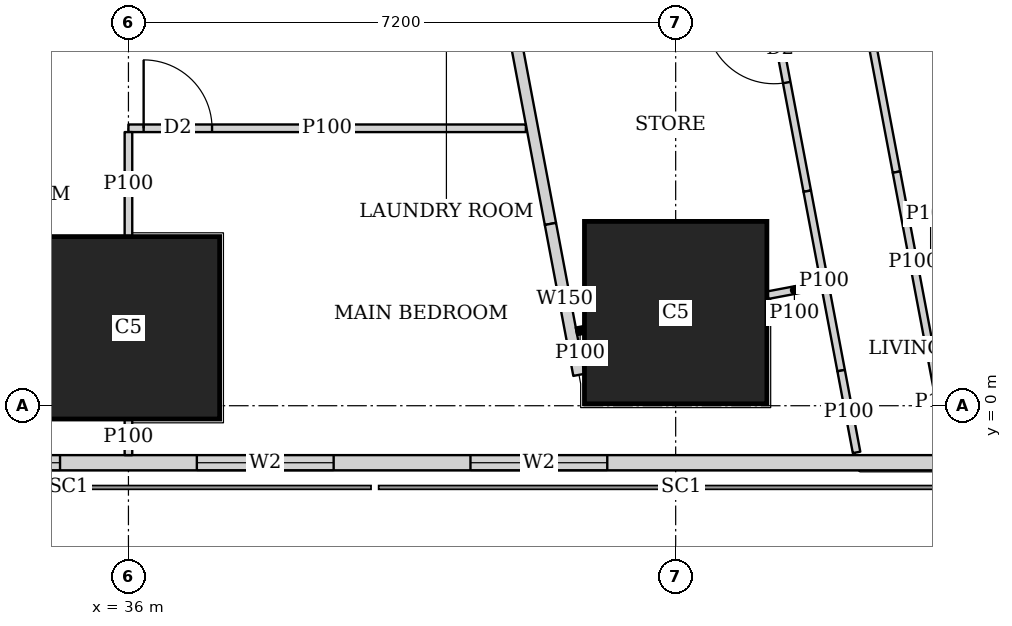
"""IFC4 building model, lengths in metres.
Left out: names, types, materials, properties, quantities, classifications, styles, units other than length and angle.
Written with IfcOpenShell. Run it as: python <this file> out.ifc"""

import sys

from ifc_helpers import new_model, si_unit, direction, frame, frame_2d, origin, origin_2d, place, context, subcontext, project, spatial, rectangle, extrude, element, fill, save


model = new_model("IFC4")
c1 = context("Model", 3, precision=1e-05, world=origin(), true_north=direction((0.0, 1.0)))
c2 = subcontext(c1, "Body", "Model", "MODEL_VIEW")
j1 = project(units=[si_unit("LENGTHUNIT", "METRE"), si_unit("PLANEANGLEUNIT", "RADIAN")], contexts=[c1])
p1 = place(None, origin())
s1 = spatial("IfcSite", under=j1, at=p1, CompositionType="ELEMENT")
p2 = place(p1, origin())
s2 = spatial("IfcBuilding", under=s1, at=p2, CompositionType="ELEMENT")
p3 = place(p2, frame((0.0, 0.0, 234.95)))
s3 = spatial("IfcBuildingStorey", under=s2, at=p3, CompositionType="ELEMENT", Elevation=234.95)
for number, where, z_axis, x_axis in (
    (1, (36.0, 1.025, 0.0), (0.0, 0.0, 1.0), (1.0, 0.0, 0.0)),
    (2, (43.2, 1.225, 0.0), (0.0, 0.0, 1.0), (1.0, 0.0, 0.0)),
):
    element("IfcColumn", number, at=place(p3, frame(where, z_axis=z_axis, x_axis=x_axis)), inside=s3, PredefinedType="COLUMN", context=c2, shape_type="SweptSolid", body=[
        extrude(rectangle(XDim=2.4, YDim=2.4, at=origin_2d()), origin(), (0.0, 0.0, 1.0), 3.75),
    ])
p4 = place(p3, frame((14.563, -0.75, 0.0), z_axis=(0.0, 0.0, 1.0), x_axis=(1.0, 0.0, 0.0)))
e3 = element("IfcWall", 3, at=p4, inside=s3, PredefinedType="SOLIDWALL", context=c2, shape_type="SweptSolid", body=[
    extrude(rectangle(XDim=33.228, YDim=0.2, at=frame_2d((16.614, 0.0))), origin(), (0.0, 0.0, 1.0), 3.5),
])
p5 = place(p4, frame((2.319, 0.0, 0.9)))
e4 = element("IfcOpeningElement", 4, at=p5, cuts=e3, PredefinedType="OPENING", context=c2, shape_type="SweptSolid", body=[
    extrude(rectangle(XDim=2.4, YDim=1.5, at=frame_2d((1.2, 0.75))), frame((0.0, 0.11, 0.0), z_axis=(0.0, -1.0, 0.0), x_axis=(1.0, 0.0, 0.0)), (0.0, 0.0, 1.0), 0.22),
])
p6 = place(p4, frame((7.937, 0.0, 0.9)))
e5 = element("IfcOpeningElement", 5, at=p6, cuts=e3, PredefinedType="OPENING", context=c2, shape_type="SweptSolid", body=[
    extrude(rectangle(XDim=1.8, YDim=1.5, at=frame_2d((0.9, 0.75))), frame((0.0, 0.11, 0.0), z_axis=(0.0, -1.0, 0.0), x_axis=(1.0, 0.0, 0.0)), (0.0, 0.0, 1.0), 0.22),
])
p7 = place(p4, frame((11.537, 0.0, 0.9)))
e6 = element("IfcOpeningElement", 6, at=p7, cuts=e3, PredefinedType="OPENING", context=c2, shape_type="SweptSolid", body=[
    extrude(rectangle(XDim=1.8, YDim=1.5, at=frame_2d((0.9, 0.75))), frame((0.0, 0.11, 0.0), z_axis=(0.0, -1.0, 0.0), x_axis=(1.0, 0.0, 0.0)), (0.0, 0.0, 1.0), 0.22),
])
p8 = place(p4, frame((15.137, 0.0, 0.9)))
e7 = element("IfcOpeningElement", 7, at=p8, cuts=e3, PredefinedType="OPENING", context=c2, shape_type="SweptSolid", body=[
    extrude(rectangle(XDim=1.8, YDim=1.5, at=frame_2d((0.9, 0.75))), frame((0.0, 0.11, 0.0), z_axis=(0.0, -1.0, 0.0), x_axis=(1.0, 0.0, 0.0)), (0.0, 0.0, 1.0), 0.22),
])
p9 = place(p4, frame((18.737, 0.0, 0.9)))
e8 = element("IfcOpeningElement", 8, at=p9, cuts=e3, PredefinedType="OPENING", context=c2, shape_type="SweptSolid", body=[
    extrude(rectangle(XDim=1.8, YDim=1.5, at=frame_2d((0.9, 0.75))), frame((0.0, 0.11, 0.0), z_axis=(0.0, -1.0, 0.0), x_axis=(1.0, 0.0, 0.0)), (0.0, 0.0, 1.0), 0.22),
])
p10 = place(p4, frame((22.337, 0.0, 0.9)))
e9 = element("IfcOpeningElement", 9, at=p10, cuts=e3, PredefinedType="OPENING", context=c2, shape_type="SweptSolid", body=[
    extrude(rectangle(XDim=1.8, YDim=1.5, at=frame_2d((0.9, 0.75))), frame((0.0, 0.11, 0.0), z_axis=(0.0, -1.0, 0.0), x_axis=(1.0, 0.0, 0.0)), (0.0, 0.0, 1.0), 0.22),
])
p11 = place(p4, frame((25.937, 0.0, 0.9)))
e10 = element("IfcOpeningElement", 10, at=p11, cuts=e3, PredefinedType="OPENING", context=c2, shape_type="SweptSolid", body=[
    extrude(rectangle(XDim=1.8, YDim=1.5, at=frame_2d((0.9, 0.75))), frame((0.0, 0.11, 0.0), z_axis=(0.0, -1.0, 0.0), x_axis=(1.0, 0.0, 0.0)), (0.0, 0.0, 1.0), 0.22),
])
p12 = place(p3, frame((50.653, 2.703, 0.0), z_axis=(0.0, 0.0, 1.0), x_axis=(-0.185612026696, 0.982623109613, 0.0)))
e11 = element("IfcWall", 11, at=p12, inside=s3, PredefinedType="SOLIDWALL", context=c2, shape_type="SweptSolid", body=[
    extrude(rectangle(XDim=41.393, YDim=0.2, at=frame_2d((20.697, 0.0))), origin(), (0.0, 0.0, 1.0), 3.5),
])
p13 = place(p12, frame((1.633, 0.0, 0.9)))
e12 = element("IfcOpeningElement", 12, at=p13, cuts=e11, PredefinedType="OPENING", context=c2, shape_type="SweptSolid", body=[
    extrude(rectangle(XDim=1.8, YDim=1.5, at=frame_2d((0.9, 0.75))), frame((0.0, 0.11, 0.0), z_axis=(0.0, -1.0, 0.0), x_axis=(1.0, 0.0, 0.0)), (0.0, 0.0, 1.0), 0.22),
])
p14 = place(p12, frame((6.032, 0.0, 0.9)))
e13 = element("IfcOpeningElement", 13, at=p14, cuts=e11, PredefinedType="OPENING", context=c2, shape_type="SweptSolid", body=[
    extrude(rectangle(XDim=1.8, YDim=1.5, at=frame_2d((0.9, 0.75))), frame((0.0, 0.11, 0.0), z_axis=(0.0, -1.0, 0.0), x_axis=(1.0, 0.0, 0.0)), (0.0, 0.0, 1.0), 0.22),
])
p15 = place(p12, frame((9.848, 0.0, 0.9)))
e14 = element("IfcOpeningElement", 14, at=p15, cuts=e11, PredefinedType="OPENING", context=c2, shape_type="SweptSolid", body=[
    extrude(rectangle(XDim=1.8, YDim=1.5, at=frame_2d((0.9, 0.75))), frame((0.0, 0.11, 0.0), z_axis=(0.0, -1.0, 0.0), x_axis=(1.0, 0.0, 0.0)), (0.0, 0.0, 1.0), 0.22),
])
p16 = place(p12, frame((13.664, 0.0, 0.9)))
e15 = element("IfcOpeningElement", 15, at=p16, cuts=e11, PredefinedType="OPENING", context=c2, shape_type="SweptSolid", body=[
    extrude(rectangle(XDim=1.8, YDim=1.5, at=frame_2d((0.9, 0.75))), frame((0.0, 0.11, 0.0), z_axis=(0.0, -1.0, 0.0), x_axis=(1.0, 0.0, 0.0)), (0.0, 0.0, 1.0), 0.22),
])
p17 = place(p12, frame((17.481, 0.0, 0.9)))
e16 = element("IfcOpeningElement", 16, at=p17, cuts=e11, PredefinedType="OPENING", context=c2, shape_type="SweptSolid", body=[
    extrude(rectangle(XDim=1.8, YDim=1.5, at=frame_2d((0.9, 0.75))), frame((0.0, 0.11, 0.0), z_axis=(0.0, -1.0, 0.0), x_axis=(1.0, 0.0, 0.0)), (0.0, 0.0, 1.0), 0.22),
])
p18 = place(p12, frame((21.297, 0.0, 0.9)))
e17 = element("IfcOpeningElement", 17, at=p18, cuts=e11, PredefinedType="OPENING", context=c2, shape_type="SweptSolid", body=[
    extrude(rectangle(XDim=1.8, YDim=1.5, at=frame_2d((0.9, 0.75))), frame((0.0, 0.11, 0.0), z_axis=(0.0, -1.0, 0.0), x_axis=(1.0, 0.0, 0.0)), (0.0, 0.0, 1.0), 0.22),
])
p19 = place(p12, frame((25.113, 0.0, 0.9)))
e18 = element("IfcOpeningElement", 18, at=p19, cuts=e11, PredefinedType="OPENING", context=c2, shape_type="SweptSolid", body=[
    extrude(rectangle(XDim=1.8, YDim=1.5, at=frame_2d((0.9, 0.75))), frame((0.0, 0.11, 0.0), z_axis=(0.0, -1.0, 0.0), x_axis=(1.0, 0.0, 0.0)), (0.0, 0.0, 1.0), 0.22),
])
p20 = place(p12, frame((28.93, 0.0, 0.9)))
e19 = element("IfcOpeningElement", 19, at=p20, cuts=e11, PredefinedType="OPENING", context=c2, shape_type="SweptSolid", body=[
    extrude(rectangle(XDim=1.8, YDim=1.5, at=frame_2d((0.9, 0.75))), frame((0.0, 0.11, 0.0), z_axis=(0.0, -1.0, 0.0), x_axis=(1.0, 0.0, 0.0)), (0.0, 0.0, 1.0), 0.22),
])
p21 = place(p12, frame((32.746, 0.0, 0.9)))
e20 = element("IfcOpeningElement", 20, at=p21, cuts=e11, PredefinedType="OPENING", context=c2, shape_type="SweptSolid", body=[
    extrude(rectangle(XDim=1.8, YDim=1.5, at=frame_2d((0.9, 0.75))), frame((0.0, 0.11, 0.0), z_axis=(0.0, -1.0, 0.0), x_axis=(1.0, 0.0, 0.0)), (0.0, 0.0, 1.0), 0.22),
])
p22 = place(p12, frame((36.481, 0.0, 0.9)))
e21 = element("IfcOpeningElement", 21, at=p22, cuts=e11, PredefinedType="OPENING", context=c2, shape_type="SweptSolid", body=[
    extrude(rectangle(XDim=1.8, YDim=1.5, at=frame_2d((0.9, 0.75))), frame((0.0, 0.11, 0.0), z_axis=(0.0, -1.0, 0.0), x_axis=(1.0, 0.0, 0.0)), (0.0, 0.0, 1.0), 0.22),
])
p23 = place(p3, frame((33.933, 42.73, 0.0), z_axis=(0.0, 0.0, 1.0), x_axis=(0.185595417643, -0.982626246825, 0.0)))
e22 = element("IfcWall", 22, at=p23, inside=s3, PredefinedType="SOLIDWALL", context=c2, shape_type="SweptSolid", body=[
    extrude(rectangle(XDim=41.051, YDim=0.15, at=frame_2d((20.525, 0.0))), origin(), (0.0, 0.0, 1.0), 2.5),
])
p24 = place(p23, frame((12.266, 0.0, 0.0)))
e23 = element("IfcOpeningElement", 23, at=p24, cuts=e22, PredefinedType="OPENING", context=c2, shape_type="SweptSolid", body=[
    extrude(rectangle(XDim=1.0, YDim=2.1, at=frame_2d((0.5, 1.05))), frame((0.0, 0.085, 0.0), z_axis=(0.0, -1.0, 0.0), x_axis=(1.0, 0.0, 0.0)), (0.0, 0.0, 1.0), 0.17),
])
p25 = place(p23, frame((16.082, 0.0, 0.0)))
e24 = element("IfcOpeningElement", 24, at=p25, cuts=e22, PredefinedType="OPENING", context=c2, shape_type="SweptSolid", body=[
    extrude(rectangle(XDim=1.0, YDim=2.1, at=frame_2d((0.5, 1.05))), frame((0.0, 0.085, 0.0), z_axis=(0.0, -1.0, 0.0), x_axis=(1.0, 0.0, 0.0)), (0.0, 0.0, 1.0), 0.17),
])
p26 = place(p23, frame((30.862, 0.0, 0.0)))
e25 = element("IfcOpeningElement", 25, at=p26, cuts=e22, PredefinedType="OPENING", context=c2, shape_type="SweptSolid", body=[
    extrude(rectangle(XDim=1.0, YDim=2.1, at=frame_2d((0.5, 1.05))), frame((0.0, 0.085, 0.0), z_axis=(0.0, -1.0, 0.0), x_axis=(1.0, 0.0, 0.0)), (0.0, 0.0, 1.0), 0.17),
])
p27 = place(p3, frame((41.552, 2.392, 0.0), z_axis=(0.0, 0.0, 1.0), x_axis=(0.185535500323, -0.982637561932, 0.0)))
e26 = element("IfcWall", 26, at=p27, inside=s3, PredefinedType="SOLIDWALL", context=c2, shape_type="SweptSolid", body=[
    extrude(rectangle(XDim=2.021, YDim=0.15, at=frame_2d((1.011, 0.0))), origin(), (0.0, 0.0, 1.0), 2.05),
])
p28 = place(p3, frame((41.229, 3.65, 0.0), z_axis=(0.0, 0.0, 1.0), x_axis=(-1.0, 0.0, 0.0)))
e27 = element("IfcWall", 27, at=p28, inside=s3, PredefinedType="PARTITIONING", context=c2, shape_type="SweptSolid", body=[
    extrude(rectangle(XDim=5.229, YDim=0.1, at=frame_2d((2.615, 0.0))), origin(), (0.0, 0.0, 1.0), 3.5),
])
p29 = place(p28, frame((4.129, 0.0, 0.0)))
e28 = element("IfcOpeningElement", 28, at=p29, cuts=e27, PredefinedType="OPENING", context=c2, shape_type="SweptSolid", body=[
    extrude(rectangle(XDim=0.9, YDim=2.1, at=frame_2d((0.45, 1.05))), frame((0.0, 0.06, 0.0), z_axis=(0.0, -1.0, 0.0), x_axis=(1.0, 0.0, 0.0)), (0.0, 0.0, 1.0), 0.12),
])
p30 = place(p3, frame((36.0, -0.65, 0.0), z_axis=(0.0, 0.0, 1.0), x_axis=(0.0, 1.0, 0.0)))
e29 = element("IfcWall", 29, at=p30, inside=s3, PredefinedType="PARTITIONING", context=c2, shape_type="SweptSolid", body=[
    extrude(rectangle(XDim=0.474, YDim=0.1, at=frame_2d((0.237, 0.0))), origin(), (0.0, 0.0, 1.0), 3.5),
])
p31 = place(p3, frame((36.0, 2.226, 0.0), z_axis=(0.0, 0.0, 1.0), x_axis=(0.0, 1.0, 0.0)))
e30 = element("IfcWall", 30, at=p31, inside=s3, PredefinedType="PARTITIONING", context=c2, shape_type="SweptSolid", body=[
    extrude(rectangle(XDim=1.374, YDim=0.1, at=frame_2d((0.687, 0.0))), origin(), (0.0, 0.0, 1.0), 3.5),
])
p32 = place(p3, frame((44.727, 10.366, 0.0), z_axis=(0.0, 0.0, 1.0), x_axis=(0.185678775129, -0.982610498858, 0.0)))
e31 = element("IfcWall", 31, at=p32, inside=s3, PredefinedType="PARTITIONING", context=c2, shape_type="SweptSolid", body=[
    extrude(rectangle(XDim=7.421, YDim=0.1, at=frame_2d((3.71, 0.0))), origin(), (0.0, 0.0, 1.0), 3.5),
])
p33 = place(p32, frame((0.151, 0.0, 0.0)))
e32 = element("IfcOpeningElement", 32, at=p33, cuts=e31, PredefinedType="OPENING", context=c2, shape_type="SweptSolid", body=[
    extrude(rectangle(XDim=0.9, YDim=2.1, at=frame_2d((0.45, 1.05))), frame((0.0, 0.06, 0.0), z_axis=(0.0, -1.0, 0.0), x_axis=(1.0, 0.0, 0.0)), (0.0, 0.0, 1.0), 0.12),
])
p34 = place(p32, frame((4.65, 0.0, 0.0)))
e33 = element("IfcOpeningElement", 33, at=p34, cuts=e31, PredefinedType="OPENING", context=c2, shape_type="SweptSolid", body=[
    extrude(rectangle(XDim=0.9, YDim=2.1, at=frame_2d((0.45, 1.05))), frame((0.0, 0.06, 0.0), z_axis=(0.0, -1.0, 0.0), x_axis=(1.0, 0.0, 0.0)), (0.0, 0.0, 1.0), 0.12),
])
p35 = place(p3, frame((46.105, 3.074, 0.0), z_axis=(0.0, 0.0, 1.0), x_axis=(0.185631845838, -0.982619365681, 0.0)))
e34 = element("IfcWall", 34, at=p35, inside=s3, PredefinedType="PARTITIONING", context=c2, shape_type="SweptSolid", body=[
    extrude(rectangle(XDim=2.403, YDim=0.1, at=frame_2d((1.201, 0.0))), origin(), (0.0, 0.0, 1.0), 2.05),
])
p36 = place(p3, frame((46.551, 0.713, 0.0), z_axis=(0.0, 0.0, 1.0), x_axis=(0.185407859198, -0.982661653748, 0.0)))
e35 = element("IfcWall", 35, at=p36, inside=s3, PredefinedType="PARTITIONING", context=c2, shape_type="SweptSolid", body=[
    extrude(rectangle(XDim=1.343, YDim=0.1, at=frame_2d((0.671, 0.0))), origin(), (0.0, 0.0, 1.0), 3.5),
])
p37 = place(p3, frame((43.949, 8.02, 0.0), z_axis=(0.0, 0.0, 1.0), x_axis=(0.185656792073, -0.982614652627, 0.0)))
e36 = element("IfcWall", 36, at=p37, inside=s3, PredefinedType="PARTITIONING", context=c2, shape_type="SweptSolid", body=[
    extrude(rectangle(XDim=5.289, YDim=0.1, at=frame_2d((2.645, 0.0))), origin(), (0.0, 0.0, 1.0), 3.5),
])
p38 = place(p37, frame((1.2, 0.0, 0.0)))
e37 = element("IfcOpeningElement", 37, at=p38, cuts=e36, PredefinedType="OPENING", context=c2, shape_type="SweptSolid", body=[
    extrude(rectangle(XDim=0.9, YDim=2.1, at=frame_2d((0.45, 1.05))), frame((0.0, 0.06, 0.0), z_axis=(0.0, -1.0, 0.0), x_axis=(1.0, 0.0, 0.0)), (0.0, 0.0, 1.0), 0.12),
])
p39 = place(p37, frame((2.935, 0.0, 0.0)))
e38 = element("IfcOpeningElement", 38, at=p39, cuts=e36, PredefinedType="OPENING", context=c2, shape_type="SweptSolid", body=[
    extrude(rectangle(XDim=0.9, YDim=2.1, at=frame_2d((0.45, 1.05))), frame((0.0, 0.06, 0.0), z_axis=(0.0, -1.0, 0.0), x_axis=(1.0, 0.0, 0.0)), (0.0, 0.0, 1.0), 0.12),
])
p40 = place(p3, frame((44.931, 2.823, 0.0), z_axis=(0.0, 0.0, 1.0), x_axis=(0.185631845838, -0.982619365681, 0.0)))
e39 = element("IfcWall", 39, at=p40, inside=s3, PredefinedType="PARTITIONING", context=c2, shape_type="SweptSolid", body=[
    extrude(rectangle(XDim=2.403, YDim=0.1, at=frame_2d((1.201, 0.0))), origin(), (0.0, 0.0, 1.0), 2.05),
])
p41 = place(p3, frame((45.377, 0.462, 0.0), z_axis=(0.0, 0.0, 1.0), x_axis=(0.185513480919, -0.982641719243, 0.0)))
e40 = element("IfcWall", 40, at=p41, inside=s3, PredefinedType="PARTITIONING", context=c2, shape_type="SweptSolid", body=[
    extrude(rectangle(XDim=1.095, YDim=0.1, at=frame_2d((0.547, 0.0))), origin(), (0.0, 0.0, 1.0), 3.5),
])
p42 = place(p3, frame((46.738, 2.006, 0.0), z_axis=(0.0, 0.0, 1.0), x_axis=(-0.982820466874, -0.184564161994, 0.0)))
e41 = element("IfcWall", 41, at=p42, inside=s3, PredefinedType="PARTITIONING", context=c2, shape_type="SweptSolid", body=[
    extrude(rectangle(XDim=0.374, YDim=0.1, at=frame_2d((0.187, 0.0))), origin(), (0.0, 0.0, 1.0), 2.05),
])
p43 = place(p3, frame((45.114, 1.587, 0.0), z_axis=(0.0, 0.0, 1.0), x_axis=(-0.982671022916, -0.185358195723, 0.0)))
e42 = element("IfcWall", 42, at=p43, inside=s3, PredefinedType="PARTITIONING", context=c2, shape_type="SweptSolid", body=[
    extrude(rectangle(XDim=0.717, YDim=0.1, at=frame_2d((0.358, 0.0))), origin(), (0.0, 0.0, 1.0), 2.05),
])
p44 = place(p3, frame((41.99, 0.997, 0.0), z_axis=(0.0, 0.0, 1.0), x_axis=(-0.982382747416, -0.186880008506, 0.0)))
e43 = element("IfcWall", 43, at=p44, inside=s3, PredefinedType="PARTITIONING", context=c2, shape_type="SweptSolid", body=[
    extrude(rectangle(XDim=0.097, YDim=0.1, at=frame_2d((0.048, 0.0))), origin(), (0.0, 0.0, 1.0), 2.05),
])
p45 = place(p9, origin())
e44 = element("IfcWindow", 44, at=p45, inside=s3, PartitioningType="SINGLE_PANEL", PredefinedType="WINDOW", context=c2, shape_type="SweptSolid", body=[
    extrude(rectangle(XDim=1.8, YDim=1.5, at=frame_2d((0.9, 0.75))), frame((0.0, 0.03, 0.0), z_axis=(0.0, -1.0, 0.0), x_axis=(1.0, 0.0, 0.0)), (0.0, 0.0, 1.0), 0.06),
])
fill(e8, e44)
p46 = place(p10, origin())
e45 = element("IfcWindow", 45, at=p46, inside=s3, PartitioningType="SINGLE_PANEL", PredefinedType="WINDOW", context=c2, shape_type="SweptSolid", body=[
    extrude(rectangle(XDim=1.8, YDim=1.5, at=frame_2d((0.9, 0.75))), frame((0.0, 0.03, 0.0), z_axis=(0.0, -1.0, 0.0), x_axis=(1.0, 0.0, 0.0)), (0.0, 0.0, 1.0), 0.06),
])
fill(e9, e45)
p47 = place(p11, origin())
e46 = element("IfcWindow", 46, at=p47, inside=s3, PartitioningType="SINGLE_PANEL", PredefinedType="WINDOW", context=c2, shape_type="SweptSolid", body=[
    extrude(rectangle(XDim=1.8, YDim=1.5, at=frame_2d((0.9, 0.75))), frame((0.0, 0.03, 0.0), z_axis=(0.0, -1.0, 0.0), x_axis=(1.0, 0.0, 0.0)), (0.0, 0.0, 1.0), 0.06),
])
fill(e10, e46)
p48 = place(p29, origin())
e47 = element("IfcDoor", 47, at=p48, inside=s3, OperationType="SINGLE_SWING_LEFT", PredefinedType="DOOR", context=c2, shape_type="SweptSolid", body=[
    extrude(rectangle(XDim=0.9, YDim=2.1, at=frame_2d((0.45, 1.05))), frame((0.0, 0.025, 0.0), z_axis=(0.0, -1.0, 0.0), x_axis=(1.0, 0.0, 0.0)), (0.0, 0.0, 1.0), 0.05),
])
fill(e28, e47)
p49 = place(p39, origin())
e48 = element("IfcDoor", 48, at=p49, inside=s3, OperationType="SINGLE_SWING_RIGHT", PredefinedType="DOOR", context=c2, shape_type="SweptSolid", body=[
    extrude(rectangle(XDim=0.9, YDim=2.1, at=frame_2d((0.45, 1.05))), frame((0.0, 0.025, 0.0), z_axis=(0.0, -1.0, 0.0), x_axis=(1.0, 0.0, 0.0)), (0.0, 0.0, 1.0), 0.05),
])
fill(e38, e48)
save(model, sys.argv[1])
